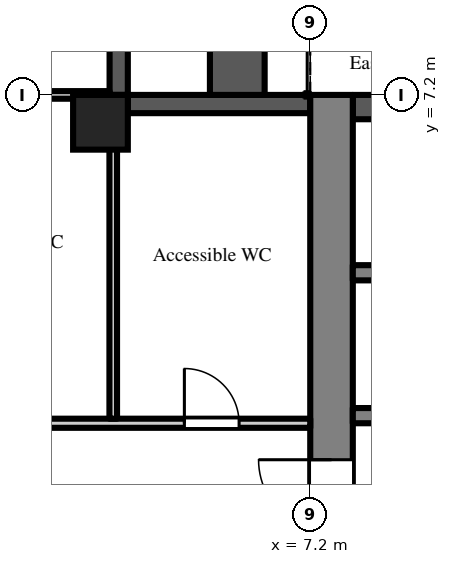
"""IFC4 building model, lengths in metres.
Left out: names, types, materials, properties, quantities, classifications, styles, units other than length and angle.
Written with IfcOpenShell. Run it as: python <this file> out.ifc"""

import sys

from ifc_helpers import new_model, si_unit, direction, frame, frame_2d, origin, origin_2d, place, context, subcontext, project, spatial, rectangle, extrude, element, fill, save


model = new_model("IFC4")
c1 = context("Model", 3, precision=1e-05, world=origin(), true_north=direction((0.0, 1.0)))
c2 = subcontext(c1, "Body", "Model", "MODEL_VIEW")
j1 = project(units=[si_unit("LENGTHUNIT", "METRE"), si_unit("PLANEANGLEUNIT", "RADIAN")], contexts=[c1])
p1 = place(None, origin())
s1 = spatial("IfcSite", under=j1, at=p1, CompositionType="ELEMENT")
p2 = place(p1, origin())
s2 = spatial("IfcBuilding", under=s1, at=p2, CompositionType="ELEMENT")
p3 = place(p2, frame((0.0, 0.0, 166.5)))
s3 = spatial("IfcBuildingStorey", under=s2, at=p3, CompositionType="ELEMENT", Elevation=166.5)
p4 = place(p3, frame((3.75, 6.75, 0.0), z_axis=(0.0, 0.0, 1.0), x_axis=(1.0, 0.0, 0.0)))
e1 = element("IfcColumn", 1, at=p4, inside=s3, PredefinedType="COLUMN", context=c2, shape_type="SweptSolid", body=[
    extrude(rectangle(XDim=0.9, YDim=0.9, at=origin_2d()), origin(), (0.0, 0.0, 1.0), 4.2),
])
p5 = place(p3, frame((7.2, 7.05, 0.0), z_axis=(0.0, 0.0, 1.0), x_axis=(-1.0, 0.0, 0.0)))
e2 = element("IfcWall", 2, at=p5, inside=s3, PredefinedType="SOLIDWALL", context=c2, shape_type="SweptSolid", body=[
    extrude(rectangle(XDim=3.0, YDim=0.3, at=frame_2d((1.5, 0.0))), origin(), (0.0, 0.0, 1.0), 3.4),
])
p6 = place(p3, frame((4.05, 7.2, 0.0), z_axis=(0.0, 0.0, 1.0), x_axis=(0.0, 1.0, 0.0)))
e3 = element("IfcWall", 3, at=p6, inside=s3, PredefinedType="SOLIDWALL", context=c2, shape_type="SweptSolid", body=[
    extrude(rectangle(XDim=7.2, YDim=0.3, at=frame_2d((3.6, 0.0))), origin(), (0.0, 0.0, 1.0), 3.4),
])
p7 = place(p6, frame((3.0, 0.0, 0.0)))
e4 = element("IfcOpeningElement", 4, at=p7, cuts=e3, PredefinedType="OPENING", context=c2, shape_type="SweptSolid", body=[
    extrude(rectangle(XDim=1.2, YDim=2.05, at=frame_2d((0.6, 1.025))), frame((0.0, 0.16, 0.0), z_axis=(0.0, -1.0, 0.0), x_axis=(1.0, 0.0, 0.0)), (0.0, 0.0, 1.0), 0.32),
])
p8 = place(p6, frame((0.9, 0.0, 0.2)))
e5 = element("IfcOpeningElement", 5, at=p8, cuts=e3, PredefinedType="OPENING", context=c2, shape_type="SweptSolid", body=[
    extrude(rectangle(XDim=1.8, YDim=1.85, at=frame_2d((0.9, 0.925))), frame((0.0, 0.16, 0.0), z_axis=(0.0, -1.0, 0.0), x_axis=(1.0, 0.0, 0.0)), (0.0, 0.0, 1.0), 0.32),
])
p9 = place(p6, frame((4.975, 0.0, 0.2)))
e6 = element("IfcOpeningElement", 6, at=p9, cuts=e3, PredefinedType="OPENING", context=c2, shape_type="SweptSolid", body=[
    extrude(rectangle(XDim=1.8, YDim=1.85, at=frame_2d((0.9, 0.925))), frame((0.0, 0.16, 0.0), z_axis=(0.0, -1.0, 0.0), x_axis=(1.0, 0.0, 0.0)), (0.0, 0.0, 1.0), 0.32),
])
p10 = place(p3, frame((6.0, 7.2, 0.0), z_axis=(0.0, 0.0, 1.0), x_axis=(0.0, 1.0, 0.0)))
e7 = element("IfcWall", 7, at=p10, inside=s3, PredefinedType="PARAPET", context=c2, shape_type="SweptSolid", body=[
    extrude(rectangle(XDim=7.2, YDim=0.9, at=frame_2d((3.6, 0.0))), origin(), (0.0, 0.0, 1.0), 0.8),
])
p11 = place(p3, frame((7.55, -7.2, 0.0), z_axis=(0.0, 0.0, 1.0), x_axis=(0.0, 1.0, 0.0)))
e8 = element("IfcWall", 8, at=p11, inside=s3, PredefinedType="SHEAR", context=c2, shape_type="SweptSolid", body=[
    extrude(rectangle(XDim=14.4, YDim=0.7, at=frame_2d((7.2, 0.0))), origin(), (0.0, 0.0, 1.0), 3.8),
])
p12 = place(p11, frame((6.0, 0.0, 0.0)))
e9 = element("IfcOpeningElement", 9, at=p12, cuts=e8, PredefinedType="OPENING", context=c2, shape_type="SweptSolid", body=[
    extrude(rectangle(XDim=2.4, YDim=2.2, at=frame_2d((1.2, 1.1))), frame((0.0, 0.36, 0.0), z_axis=(0.0, -1.0, 0.0), x_axis=(1.0, 0.0, 0.0)), (0.0, 0.0, 1.0), 0.72),
])
p13 = place(p3, frame((7.9, 7.0, 0.0), z_axis=(0.0, 0.0, 1.0), x_axis=(1.0, 0.0, 0.0)))
e10 = element("IfcWall", 10, at=p13, inside=s3, PredefinedType="SHEAR", context=c2, shape_type="SweptSolid", body=[
    extrude(rectangle(XDim=12.95, YDim=0.4, at=frame_2d((6.475, 0.0))), origin(), (0.0, 0.0, 1.0), 3.8),
])
p14 = place(p3, frame((7.9, 1.925, 0.0), z_axis=(0.0, 0.0, 1.0), x_axis=(1.0, 0.0, 0.0)))
e11 = element("IfcWall", 11, at=p14, inside=s3, PredefinedType="SHEAR", context=c2, shape_type="SweptSolid", body=[
    extrude(rectangle(XDim=12.95, YDim=0.25, at=frame_2d((6.475, 0.0))), origin(), (0.0, 0.0, 1.0), 3.8),
])
p15 = place(p14, frame((4.825, 0.0, 0.0)))
e12 = element("IfcOpeningElement", 12, at=p15, cuts=e11, PredefinedType="OPENING", context=c2, shape_type="SweptSolid", body=[
    extrude(rectangle(XDim=1.1, YDim=2.1, at=frame_2d((0.55, 1.05))), frame((0.0, 0.135, 0.0), z_axis=(0.0, -1.0, 0.0), x_axis=(1.0, 0.0, 0.0)), (0.0, 0.0, 1.0), 0.27),
])
p16 = place(p14, frame((7.025, 0.0, 0.0)))
e13 = element("IfcOpeningElement", 13, at=p16, cuts=e11, PredefinedType="OPENING", context=c2, shape_type="SweptSolid", body=[
    extrude(rectangle(XDim=1.1, YDim=2.1, at=frame_2d((0.55, 1.05))), frame((0.0, 0.135, 0.0), z_axis=(0.0, -1.0, 0.0), x_axis=(1.0, 0.0, 0.0)), (0.0, 0.0, 1.0), 0.27),
])
p17 = place(p14, frame((9.225, 0.0, 0.0)))
e14 = element("IfcOpeningElement", 14, at=p17, cuts=e11, PredefinedType="OPENING", context=c2, shape_type="SweptSolid", body=[
    extrude(rectangle(XDim=1.1, YDim=2.1, at=frame_2d((0.55, 1.05))), frame((0.0, 0.135, 0.0), z_axis=(0.0, -1.0, 0.0), x_axis=(1.0, 0.0, 0.0)), (0.0, 0.0, 1.0), 0.27),
])
p18 = place(p14, frame((0.525, 0.0, 0.0)))
e15 = element("IfcOpeningElement", 15, at=p18, cuts=e11, PredefinedType="OPENING", context=c2, shape_type="SweptSolid", body=[
    extrude(rectangle(XDim=0.9, YDim=2.1, at=frame_2d((0.45, 1.05))), frame((0.0, 0.135, 0.0), z_axis=(0.0, -1.0, 0.0), x_axis=(1.0, 0.0, 0.0)), (0.0, 0.0, 1.0), 0.27),
])
p19 = place(p14, frame((2.575, 0.0, 0.0)))
e16 = element("IfcOpeningElement", 16, at=p19, cuts=e11, PredefinedType="OPENING", context=c2, shape_type="SweptSolid", body=[
    extrude(rectangle(XDim=1.2, YDim=2.1, at=frame_2d((0.6, 1.05))), frame((0.0, 0.135, 0.0), z_axis=(0.0, -1.0, 0.0), x_axis=(1.0, 0.0, 0.0)), (0.0, 0.0, 1.0), 0.27),
])
p20 = place(p14, frame((11.525, 0.0, 0.0)))
e17 = element("IfcOpeningElement", 17, at=p20, cuts=e11, PredefinedType="OPENING", context=c2, shape_type="SweptSolid", body=[
    extrude(rectangle(XDim=0.9, YDim=2.1, at=frame_2d((0.45, 1.05))), frame((0.0, 0.135, 0.0), z_axis=(0.0, -1.0, 0.0), x_axis=(1.0, 0.0, 0.0)), (0.0, 0.0, 1.0), 0.27),
])
p21 = place(p3, frame((7.9, 4.275, 0.0), z_axis=(0.0, 0.0, 1.0), x_axis=(1.0, 0.0, 0.0)))
e18 = element("IfcWall", 18, at=p21, inside=s3, PredefinedType="SHEAR", context=c2, shape_type="SweptSolid", body=[
    extrude(rectangle(XDim=1.95, YDim=0.25, at=frame_2d((0.975, 0.0))), origin(), (0.0, 0.0, 1.0), 3.8),
])
p22 = place(p3, frame((1.875, 1.8, 0.0), z_axis=(0.0, 0.0, 1.0), x_axis=(1.0, 0.0, 0.0)))
e19 = element("IfcWall", 19, at=p22, inside=s3, PredefinedType="PARTITIONING", context=c2, shape_type="SweptSolid", body=[
    extrude(rectangle(XDim=5.325, YDim=0.15, at=frame_2d((2.663, 0.0))), origin(), (0.0, 0.0, 1.0), 3.8),
])
p23 = place(p22, frame((3.255, 0.0, 0.0)))
e20 = element("IfcOpeningElement", 20, at=p23, cuts=e19, PredefinedType="OPENING", context=c2, shape_type="SweptSolid", body=[
    extrude(rectangle(XDim=0.9, YDim=2.1, at=frame_2d((0.45, 1.05))), frame((0.0, 0.085, 0.0), z_axis=(0.0, -1.0, 0.0), x_axis=(1.0, 0.0, 0.0)), (0.0, 0.0, 1.0), 0.17),
])
p24 = place(p3, frame((1.8, 7.2, 0.0), z_axis=(0.0, 0.0, 1.0), x_axis=(1.0, 0.0, 0.0)))
e21 = element("IfcWall", 21, at=p24, inside=s3, PredefinedType="PARTITIONING", context=c2, shape_type="SweptSolid", body=[
    extrude(rectangle(XDim=2.1, YDim=0.125, at=frame_2d((1.05, 0.0))), origin(), (0.0, 0.0, 1.0), 3.8),
])
p25 = place(p3, frame((3.96, 1.875, 0.0), z_axis=(0.0, 0.0, 1.0), x_axis=(0.0, 1.0, 0.0)))
e22 = element("IfcWall", 22, at=p25, inside=s3, PredefinedType="PARTITIONING", context=c2, shape_type="SweptSolid", body=[
    extrude(rectangle(XDim=5.025, YDim=0.125, at=frame_2d((2.512, 0.0))), origin(), (0.0, 0.0, 1.0), 3.8),
])
p26 = place(p12, origin())
e23 = element("IfcDoor", 23, at=p26, inside=s3, OperationType="DOUBLE_DOOR_DOUBLE_SWING", PredefinedType="DOOR", context=c2, shape_type="SweptSolid", body=[
    extrude(rectangle(XDim=2.4, YDim=2.2, at=frame_2d((1.2, 1.1))), frame((0.0, 0.025, 0.0), z_axis=(0.0, -1.0, 0.0), x_axis=(1.0, 0.0, 0.0)), (0.0, 0.0, 1.0), 0.05),
])
fill(e9, e23)
p27 = place(p23, origin())
e24 = element("IfcDoor", 24, at=p27, inside=s3, OperationType="SINGLE_SWING_LEFT", PredefinedType="DOOR", context=c2, shape_type="SweptSolid", body=[
    extrude(rectangle(XDim=0.9, YDim=2.1, at=frame_2d((0.45, 1.05))), frame((0.0, 0.025, 0.0), z_axis=(0.0, -1.0, 0.0), x_axis=(1.0, 0.0, 0.0)), (0.0, 0.0, 1.0), 0.05),
])
fill(e20, e24)
save(model, sys.argv[1])
